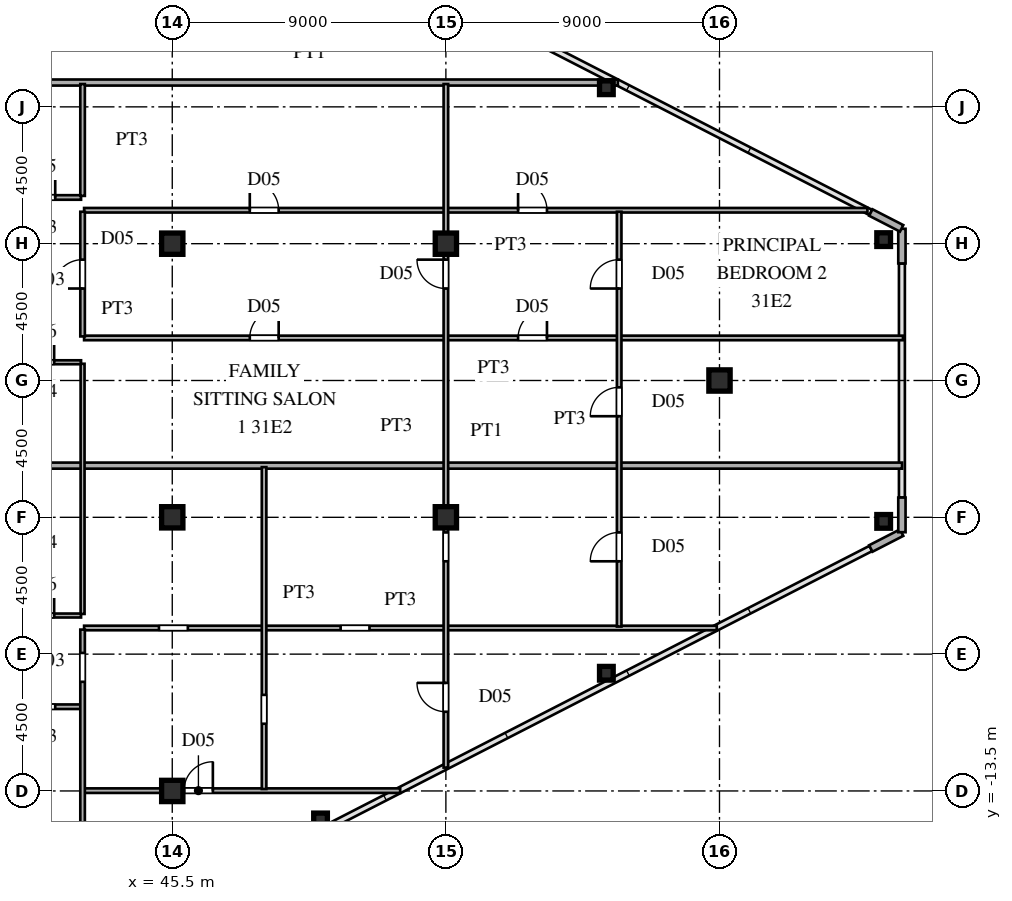
"""IFC4 building model, lengths in metres.
Left out: names, types, materials, properties, quantities, classifications, styles, units other than length and angle.
Written with IfcOpenShell. Run it as: python <this file> out.ifc"""

import sys

from ifc_helpers import new_model, si_unit, direction, frame, frame_2d, origin, origin_2d, place, context, subcontext, project, spatial, rectangle, hollow_rectangle, i_section, extrude, source, transform, mapped, element, fill, save


model = new_model("IFC4")
c1 = context("Model", 3, precision=1e-05, world=origin(), true_north=direction((0.0, 1.0)))
c2 = subcontext(c1, "Body", "Model", "MODEL_VIEW")
j1 = project(units=[si_unit("LENGTHUNIT", "METRE"), si_unit("PLANEANGLEUNIT", "RADIAN")], contexts=[c1])
p1 = place(None, origin())
s1 = spatial("IfcSite", under=j1, at=p1, CompositionType="ELEMENT")
p2 = place(p1, origin())
s2 = spatial("IfcBuilding", under=s1, at=p2, CompositionType="ELEMENT")
p3 = place(p2, frame((0.0, 0.0, 117.6)))
s3 = spatial("IfcBuildingStorey", under=s2, at=p3, CompositionType="ELEMENT", Elevation=117.6)
m1 = source(origin(), c2, "Body", "SweptSolid", [
    extrude(i_section(OverallWidth=0.7, OverallDepth=0.7, WebThickness=0.028, FlangeThickness=0.045, at=origin_2d()), origin(), (0.0, 0.0, 1.0), 3.6),
])
for number, where, z_axis, x_axis in (
    (1, (45.5, -13.5, 0.0), (0.0, 0.0, 1.0), (1.0, 0.0, 0.0)),
    (2, (45.5, -4.5, 0.0), (0.0, 0.0, 1.0), (1.0, 0.0, 0.0)),
    (3, (45.5, 4.5, 0.0), (0.0, 0.0, 1.0), (1.0, 0.0, 0.0)),
    (4, (54.5, -4.5, 0.0), (0.0, 0.0, 1.0), (1.0, 0.0, 0.0)),
    (5, (54.5, 4.5, 0.0), (0.0, 0.0, 1.0), (1.0, 0.0, 0.0)),
    (6, (63.5, 0.0, 0.0), (0.0, 0.0, 1.0), (1.0, 0.0, 0.0)),
):
    element("IfcColumn", number, at=place(p3, frame(where, z_axis=z_axis, x_axis=x_axis)), inside=s3, PredefinedType="COLUMN", context=c2, shape_type="MappedRepresentation", body=[
        mapped(m1, transform((0.0, 0.0, 0.0), scale=1.0)),
    ])
m2 = source(origin(), c2, "Body", "SweptSolid", [
    extrude(hollow_rectangle(XDim=0.45, YDim=0.45, WallThickness=0.018, at=origin_2d()), origin(), (0.0, 0.0, 1.0), 3.6),
])
for number, where, z_axis, x_axis in (
    (7, (68.9, -4.634, 0.0), (0.0, 0.0, 1.0), (1.0, 0.0, 0.0)),
    (8, (68.9, 4.634, 0.0), (0.0, 0.0, 1.0), (1.0, 0.0, 0.0)),
    (9, (50.377, -14.453, 0.0), (0.0, 0.0, 1.0), (1.0, 0.0, 0.0)),
    (10, (59.779, -9.629, 0.0), (0.0, 0.0, 1.0), (1.0, 0.0, 0.0)),
    (11, (59.779, 9.629, 0.0), (0.0, 0.0, 1.0), (1.0, 0.0, 0.0)),
):
    element("IfcColumn", number, at=place(p3, frame(where, z_axis=z_axis, x_axis=x_axis)), inside=s3, PredefinedType="COLUMN", context=c2, shape_type="MappedRepresentation", body=[
        mapped(m2, transform((0.0, 0.0, 0.0), scale=1.0)),
    ])
p4 = place(p3, frame((68.477, -5.525, 0.0), z_axis=(0.0, 0.0, 1.0), x_axis=(0.889797395748, 0.456355776255, 0.0)))
e12 = element("IfcWall", 12, at=p4, inside=s3, PredefinedType="SOLIDWALL", context=c2, shape_type="SweptSolid", body=[
    extrude(rectangle(XDim=1.14, YDim=0.24, at=frame_2d((0.57, 0.0))), origin(), (0.0, 0.0, 1.0), 3.38),
])
for number, where, z_axis, x_axis in (
    (13, (69.5, -4.99, 0.0), (0.0, 0.0, 1.0), (0.0, 1.0, 0.0)),
    (14, (69.5, 3.85, 0.0), (0.0, 0.0, 1.0), (0.0, 1.0, 0.0)),
):
    element("IfcWall", number, at=place(p3, frame(where, z_axis=z_axis, x_axis=x_axis)), inside=s3, PredefinedType="SOLIDWALL", context=c2, shape_type="SweptSolid", body=[
        extrude(rectangle(XDim=1.14, YDim=0.24, at=frame_2d((0.57, 0.0))), origin(), (0.0, 0.0, 1.0), 3.38),
    ])
p5 = place(p3, frame((69.491, 5.005, 0.0), z_axis=(0.0, 0.0, 1.0), x_axis=(-0.889797395748, 0.456355776255, 0.0)))
e15 = element("IfcWall", 15, at=p5, inside=s3, PredefinedType="SOLIDWALL", context=c2, shape_type="SweptSolid", body=[
    extrude(rectangle(XDim=1.14, YDim=0.24, at=frame_2d((0.57, 0.0))), origin(), (0.0, 0.0, 1.0), 3.38),
])
p6 = place(p3, frame((42.6, -13.49, 0.0), z_axis=(0.0, 0.0, 1.0), x_axis=(1.0, 0.0, 0.0)))
e16 = element("IfcWall", 16, at=p6, inside=s3, PredefinedType="PARTITIONING", context=c2, shape_type="SweptSolid", body=[
    extrude(rectangle(XDim=10.397, YDim=0.15, at=frame_2d((5.198, 0.0))), origin(), (0.0, 0.0, 1.0), 2.78),
])
p7 = place(p6, frame((3.285, 0.0, 0.0)))
e17 = element("IfcOpeningElement", 17, at=p7, cuts=e16, PredefinedType="OPENING", context=c2, shape_type="SweptSolid", body=[
    extrude(rectangle(XDim=0.95, YDim=2.15, at=frame_2d((0.475, 1.075))), frame((0.0, 0.085, 0.0), z_axis=(0.0, -1.0, 0.0), x_axis=(1.0, 0.0, 0.0)), (0.0, 0.0, 1.0), 0.17),
])
p8 = place(p3, frame((39.85, -10.73, 0.0), z_axis=(0.0, 0.0, 1.0), x_axis=(1.0, 0.0, 0.0)))
e18 = element("IfcWall", 18, at=p8, inside=s3, PredefinedType="PARTITIONING", context=c2, shape_type="SweptSolid", body=[
    extrude(rectangle(XDim=2.65, YDim=0.15, at=frame_2d((1.325, 0.0))), origin(), (0.0, 0.0, 1.0), 3.38),
])
p9 = place(p8, frame((0.85, 0.0, 0.0)))
e19 = element("IfcOpeningElement", 19, at=p9, cuts=e18, PredefinedType="OPENING", context=c2, shape_type="SweptSolid", body=[
    extrude(rectangle(XDim=0.95, YDim=2.15, at=frame_2d((0.475, 1.075))), frame((0.0, 0.085, 0.0), z_axis=(0.0, -1.0, 0.0), x_axis=(1.0, 0.0, 0.0)), (0.0, 0.0, 1.0), 0.17),
])
p10 = place(p3, frame((42.6, -8.14, 0.0), z_axis=(0.0, 0.0, 1.0), x_axis=(1.0, 0.0, 0.0)))
e20 = element("IfcWall", 20, at=p10, inside=s3, PredefinedType="PARTITIONING", context=c2, shape_type="SweptSolid", body=[
    extrude(rectangle(XDim=20.81, YDim=0.15, at=frame_2d((10.405, 0.0))), origin(), (0.0, 0.0, 1.0), 3.38),
])
p11 = place(p10, frame((2.462, 0.0, 0.0)))
e21 = element("IfcOpeningElement", 21, at=p11, cuts=e20, PredefinedType="OPENING", context=c2, shape_type="SweptSolid", body=[
    extrude(rectangle(XDim=0.95, YDim=2.15, at=frame_2d((0.475, 1.075))), frame((0.0, 0.085, 0.0), z_axis=(0.0, -1.0, 0.0), x_axis=(1.0, 0.0, 0.0)), (0.0, 0.0, 1.0), 0.17),
])
p12 = place(p10, frame((8.438, 0.0, 0.0)))
e22 = element("IfcOpeningElement", 22, at=p12, cuts=e20, PredefinedType="OPENING", context=c2, shape_type="SweptSolid", body=[
    extrude(rectangle(XDim=0.95, YDim=2.15, at=frame_2d((0.475, 1.075))), frame((0.0, 0.085, 0.0), z_axis=(0.0, -1.0, 0.0), x_axis=(1.0, 0.0, 0.0)), (0.0, 0.0, 1.0), 0.17),
])
p13 = place(p3, frame((39.85, -7.73, 0.0), z_axis=(0.0, 0.0, 1.0), x_axis=(1.0, 0.0, 0.0)))
e23 = element("IfcWall", 23, at=p13, inside=s3, PredefinedType="PARTITIONING", context=c2, shape_type="SweptSolid", body=[
    extrude(rectangle(XDim=2.65, YDim=0.13, at=frame_2d((1.325, 0.0))), origin(), (0.0, 0.0, 1.0), 3.38),
])
p14 = place(p13, frame((0.885, 0.0, 0.0)))
e24 = element("IfcOpeningElement", 24, at=p14, cuts=e23, PredefinedType="OPENING", context=c2, shape_type="SweptSolid", body=[
    extrude(rectangle(XDim=0.88, YDim=2.1, at=frame_2d((0.44, 1.05))), frame((0.0, 0.075, 0.0), z_axis=(0.0, -1.0, 0.0), x_axis=(1.0, 0.0, 0.0)), (0.0, 0.0, 1.0), 0.15),
])
p15 = place(p3, frame((39.88, -2.8, 0.0), z_axis=(0.0, 0.0, 1.0), x_axis=(1.0, 0.0, 0.0)))
e25 = element("IfcWall", 25, at=p15, inside=s3, PredefinedType="PARTITIONING", context=c2, shape_type="SweptSolid", body=[
    extrude(rectangle(XDim=29.625, YDim=0.2, at=frame_2d((14.812, 0.0))), origin(), (0.0, 0.0, 1.0), 3.38),
])
p16 = place(p3, frame((39.85, 0.6, 0.0), z_axis=(0.0, 0.0, 1.0), x_axis=(1.0, 0.0, 0.0)))
e26 = element("IfcWall", 26, at=p16, inside=s3, PredefinedType="PARTITIONING", context=c2, shape_type="SweptSolid", body=[
    extrude(rectangle(XDim=2.65, YDim=0.13, at=frame_2d((1.325, 0.0))), origin(), (0.0, 0.0, 1.0), 3.38),
])
p17 = place(p16, frame((0.885, 0.0, 0.0)))
e27 = element("IfcOpeningElement", 27, at=p17, cuts=e26, PredefinedType="OPENING", context=c2, shape_type="SweptSolid", body=[
    extrude(rectangle(XDim=0.88, YDim=2.1, at=frame_2d((0.44, 1.05))), frame((0.0, 0.075, 0.0), z_axis=(0.0, -1.0, 0.0), x_axis=(1.0, 0.0, 0.0)), (0.0, 0.0, 1.0), 0.15),
])
p18 = place(p3, frame((42.6, 1.4, 0.0), z_axis=(0.0, 0.0, 1.0), x_axis=(1.0, 0.0, 0.0)))
e28 = element("IfcWall", 28, at=p18, inside=s3, PredefinedType="PARTITIONING", context=c2, shape_type="SweptSolid", body=[
    extrude(rectangle(XDim=26.935, YDim=0.15, at=frame_2d((13.467, 0.0))), origin(), (0.0, 0.0, 1.0), 3.38),
])
p19 = place(p18, frame((5.45, 0.0, 0.0)))
e29 = element("IfcOpeningElement", 29, at=p19, cuts=e28, PredefinedType="OPENING", context=c2, shape_type="SweptSolid", body=[
    extrude(rectangle(XDim=0.95, YDim=2.15, at=frame_2d((0.475, 1.075))), frame((0.0, 0.085, 0.0), z_axis=(0.0, -1.0, 0.0), x_axis=(1.0, 0.0, 0.0)), (0.0, 0.0, 1.0), 0.17),
])
p20 = place(p18, frame((14.275, 0.0, 0.0)))
e30 = element("IfcOpeningElement", 30, at=p20, cuts=e28, PredefinedType="OPENING", context=c2, shape_type="SweptSolid", body=[
    extrude(rectangle(XDim=0.95, YDim=2.15, at=frame_2d((0.475, 1.075))), frame((0.0, 0.085, 0.0), z_axis=(0.0, -1.0, 0.0), x_axis=(1.0, 0.0, 0.0)), (0.0, 0.0, 1.0), 0.17),
])
p21 = place(p3, frame((42.6, 5.6, 0.0), z_axis=(0.0, 0.0, 1.0), x_axis=(1.0, 0.0, 0.0)))
e31 = element("IfcWall", 31, at=p21, inside=s3, PredefinedType="PARTITIONING", context=c2, shape_type="SweptSolid", body=[
    extrude(rectangle(XDim=25.766, YDim=0.15, at=frame_2d((12.883, 0.0))), origin(), (0.0, 0.0, 1.0), 3.38),
])
p22 = place(p21, frame((5.45, 0.0, 0.0)))
e32 = element("IfcOpeningElement", 32, at=p22, cuts=e31, PredefinedType="OPENING", context=c2, shape_type="SweptSolid", body=[
    extrude(rectangle(XDim=0.95, YDim=2.15, at=frame_2d((0.475, 1.075))), frame((0.0, 0.085, 0.0), z_axis=(0.0, -1.0, 0.0), x_axis=(1.0, 0.0, 0.0)), (0.0, 0.0, 1.0), 0.17),
])
p23 = place(p21, frame((14.275, 0.0, 0.0)))
e33 = element("IfcOpeningElement", 33, at=p23, cuts=e31, PredefinedType="OPENING", context=c2, shape_type="SweptSolid", body=[
    extrude(rectangle(XDim=0.95, YDim=2.15, at=frame_2d((0.475, 1.075))), frame((0.0, 0.085, 0.0), z_axis=(0.0, -1.0, 0.0), x_axis=(1.0, 0.0, 0.0)), (0.0, 0.0, 1.0), 0.17),
])
p24 = place(p3, frame((39.85, 6.02, 0.0), z_axis=(0.0, 0.0, 1.0), x_axis=(1.0, 0.0, 0.0)))
e34 = element("IfcWall", 34, at=p24, inside=s3, PredefinedType="PARTITIONING", context=c2, shape_type="SweptSolid", body=[
    extrude(rectangle(XDim=2.65, YDim=0.15, at=frame_2d((1.325, 0.0))), origin(), (0.0, 0.0, 1.0), 3.38),
])
p25 = place(p24, frame((0.85, 0.0, 0.0)))
e35 = element("IfcOpeningElement", 35, at=p25, cuts=e34, PredefinedType="OPENING", context=c2, shape_type="SweptSolid", body=[
    extrude(rectangle(XDim=0.95, YDim=2.15, at=frame_2d((0.475, 1.075))), frame((0.0, 0.085, 0.0), z_axis=(0.0, -1.0, 0.0), x_axis=(1.0, 0.0, 0.0)), (0.0, 0.0, 1.0), 0.17),
])
p26 = place(p3, frame((39.88, 9.8, 0.0), z_axis=(0.0, 0.0, 1.0), x_axis=(1.0, 0.0, 0.0)))
e36 = element("IfcWall", 36, at=p26, inside=s3, PredefinedType="PARTITIONING", context=c2, shape_type="SweptSolid", body=[
    extrude(rectangle(XDim=20.277, YDim=0.2, at=frame_2d((10.139, 0.0))), origin(), (0.0, 0.0, 1.0), 3.38),
])
p27 = place(p3, frame((42.55, -18.865, 0.0), z_axis=(0.0, 0.0, 1.0), x_axis=(0.0, 1.0, 0.0)))
e37 = element("IfcWall", 37, at=p27, inside=s3, PredefinedType="PARTITIONING", context=c2, shape_type="SweptSolid", body=[
    extrude(rectangle(XDim=10.672, YDim=0.15, at=frame_2d((5.336, 0.0))), origin(), (0.0, 0.0, 1.0), 3.38),
])
p28 = place(p27, frame((8.955, 0.0, 0.0)))
e38 = element("IfcOpeningElement", 38, at=p28, cuts=e37, PredefinedType="OPENING", context=c2, shape_type="SweptSolid", body=[
    extrude(rectangle(XDim=0.95, YDim=2.15, at=frame_2d((0.475, 1.075))), frame((0.0, 0.085, 0.0), z_axis=(0.0, -1.0, 0.0), x_axis=(1.0, 0.0, 0.0)), (0.0, 0.0, 1.0), 0.17),
])
p29 = place(p3, frame((42.55, -7.678, 0.0), z_axis=(0.0, 0.0, 1.0), x_axis=(0.0, 1.0, 0.0)))
e39 = element("IfcWall", 39, at=p29, inside=s3, PredefinedType="PARTITIONING", context=c2, shape_type="SweptSolid", body=[
    extrude(rectangle(XDim=8.228, YDim=0.13, at=frame_2d((4.114, 0.0))), origin(), (0.0, 0.0, 1.0), 3.38),
])
p30 = place(p3, frame((42.55, 1.45, 0.0), z_axis=(0.0, 0.0, 1.0), x_axis=(0.0, 1.0, 0.0)))
e40 = element("IfcWall", 40, at=p30, inside=s3, PredefinedType="PARTITIONING", context=c2, shape_type="SweptSolid", body=[
    extrude(rectangle(XDim=4.1, YDim=0.15, at=frame_2d((2.05, 0.0))), origin(), (0.0, 0.0, 1.0), 3.38),
])
p31 = place(p30, frame((1.575, 0.0, 0.0)))
e41 = element("IfcOpeningElement", 41, at=p31, cuts=e40, PredefinedType="OPENING", context=c2, shape_type="SweptSolid", body=[
    extrude(rectangle(XDim=0.95, YDim=2.15, at=frame_2d((0.475, 1.075))), frame((0.0, 0.085, 0.0), z_axis=(0.0, -1.0, 0.0), x_axis=(1.0, 0.0, 0.0)), (0.0, 0.0, 1.0), 0.17),
])
p32 = place(p3, frame((42.55, 6.072, 0.0), z_axis=(0.0, 0.0, 1.0), x_axis=(0.0, 1.0, 0.0)))
e42 = element("IfcWall", 42, at=p32, inside=s3, PredefinedType="PARTITIONING", context=c2, shape_type="SweptSolid", body=[
    extrude(rectangle(XDim=3.678, YDim=0.15, at=frame_2d((1.839, 0.0))), origin(), (0.0, 0.0, 1.0), 3.38),
])
p33 = place(p3, frame((48.52, -13.436, 0.0), z_axis=(0.0, 0.0, 1.0), x_axis=(0.0, 1.0, 0.0)))
e43 = element("IfcWall", 43, at=p33, inside=s3, PredefinedType="PARTITIONING", context=c2, shape_type="SweptSolid", body=[
    extrude(rectangle(XDim=10.586, YDim=0.15, at=frame_2d((5.293, 0.0))), origin(), (0.0, 0.0, 1.0), 3.38),
])
p34 = place(p33, frame((2.146, 0.0, 0.0)))
e44 = element("IfcOpeningElement", 44, at=p34, cuts=e43, PredefinedType="OPENING", context=c2, shape_type="SweptSolid", body=[
    extrude(rectangle(XDim=0.95, YDim=2.15, at=frame_2d((0.475, 1.075))), frame((0.0, 0.085, 0.0), z_axis=(0.0, -1.0, 0.0), x_axis=(1.0, 0.0, 0.0)), (0.0, 0.0, 1.0), 0.17),
])
p35 = place(p3, frame((54.5, -12.732, 0.0), z_axis=(0.0, 0.0, 1.0), x_axis=(0.0, 1.0, 0.0)))
e45 = element("IfcWall", 45, at=p35, inside=s3, PredefinedType="PARTITIONING", context=c2, shape_type="SweptSolid", body=[
    extrude(rectangle(XDim=22.482, YDim=0.15, at=frame_2d((11.241, 0.0))), origin(), (0.0, 0.0, 1.0), 2.78),
])
p36 = place(p35, frame((1.837, 0.0, 0.0)))
e46 = element("IfcOpeningElement", 46, at=p36, cuts=e45, PredefinedType="OPENING", context=c2, shape_type="SweptSolid", body=[
    extrude(rectangle(XDim=0.95, YDim=2.15, at=frame_2d((0.475, 1.075))), frame((0.0, 0.085, 0.0), z_axis=(0.0, -1.0, 0.0), x_axis=(1.0, 0.0, 0.0)), (0.0, 0.0, 1.0), 0.17),
])
p37 = place(p35, frame((6.785, 0.0, 0.0)))
e47 = element("IfcOpeningElement", 47, at=p37, cuts=e45, PredefinedType="OPENING", context=c2, shape_type="SweptSolid", body=[
    extrude(rectangle(XDim=0.95, YDim=2.15, at=frame_2d((0.475, 1.075))), frame((0.0, 0.085, 0.0), z_axis=(0.0, -1.0, 0.0), x_axis=(1.0, 0.0, 0.0)), (0.0, 0.0, 1.0), 0.17),
])
p38 = place(p35, frame((15.757, 0.0, 0.0)))
e48 = element("IfcOpeningElement", 48, at=p38, cuts=e45, PredefinedType="OPENING", context=c2, shape_type="SweptSolid", body=[
    extrude(rectangle(XDim=0.95, YDim=2.15, at=frame_2d((0.475, 1.075))), frame((0.0, 0.085, 0.0), z_axis=(0.0, -1.0, 0.0), x_axis=(1.0, 0.0, 0.0)), (0.0, 0.0, 1.0), 0.17),
])
p39 = place(p3, frame((60.2, -8.093, 0.0), z_axis=(0.0, 0.0, 1.0), x_axis=(0.0, 1.0, 0.0)))
e49 = element("IfcWall", 49, at=p39, inside=s3, PredefinedType="PARTITIONING", context=c2, shape_type="SweptSolid", body=[
    extrude(rectangle(XDim=13.643, YDim=0.15, at=frame_2d((6.822, 0.0))), origin(), (0.0, 0.0, 1.0), 3.38),
])
p40 = place(p39, frame((2.146, 0.0, 0.0)))
e50 = element("IfcOpeningElement", 50, at=p40, cuts=e49, PredefinedType="OPENING", context=c2, shape_type="SweptSolid", body=[
    extrude(rectangle(XDim=0.95, YDim=2.15, at=frame_2d((0.475, 1.075))), frame((0.0, 0.085, 0.0), z_axis=(0.0, -1.0, 0.0), x_axis=(1.0, 0.0, 0.0)), (0.0, 0.0, 1.0), 0.17),
])
p41 = place(p39, frame((6.918, 0.0, 0.0)))
e51 = element("IfcOpeningElement", 51, at=p41, cuts=e49, PredefinedType="OPENING", context=c2, shape_type="SweptSolid", body=[
    extrude(rectangle(XDim=0.95, YDim=2.15, at=frame_2d((0.475, 1.075))), frame((0.0, 0.085, 0.0), z_axis=(0.0, -1.0, 0.0), x_axis=(1.0, 0.0, 0.0)), (0.0, 0.0, 1.0), 0.17),
])
p42 = place(p39, frame((11.118, 0.0, 0.0)))
e52 = element("IfcOpeningElement", 52, at=p42, cuts=e49, PredefinedType="OPENING", context=c2, shape_type="SweptSolid", body=[
    extrude(rectangle(XDim=0.95, YDim=2.15, at=frame_2d((0.475, 1.075))), frame((0.0, 0.085, 0.0), z_axis=(0.0, -1.0, 0.0), x_axis=(1.0, 0.0, 0.0)), (0.0, 0.0, 1.0), 0.17),
])
m3 = source(origin(), c2, "Body", "SweptSolid", [
    extrude(rectangle(XDim=0.95, YDim=2.15, at=frame_2d((0.475, 1.075))), frame((0.0, 0.025, 0.0), z_axis=(0.0, -1.0, 0.0), x_axis=(1.0, 0.0, 0.0)), (0.0, 0.0, 1.0), 0.05),
])
p43 = place(p7, origin())
e53 = element("IfcDoor", 53, at=p43, inside=s3, OperationType="SINGLE_SWING_RIGHT", PredefinedType="DOOR", context=c2, shape_type="MappedRepresentation", body=[
    mapped(m3, transform((0.0, 0.0, 0.0), scale=1.0)),
])
fill(e17, e53)
m4 = source(origin(), c2, "Body", "SweptSolid", [
    extrude(rectangle(XDim=0.88, YDim=2.1, at=frame_2d((0.44, 1.05))), frame((0.0, 0.025, 0.0), z_axis=(0.0, -1.0, 0.0), x_axis=(1.0, 0.0, 0.0)), (0.0, 0.0, 1.0), 0.05),
])
p44 = place(p14, origin())
e54 = element("IfcDoor", 54, at=p44, inside=s3, OperationType="SINGLE_SWING_RIGHT", PredefinedType="DOOR", context=c2, shape_type="MappedRepresentation", body=[
    mapped(m4, transform((0.0, 0.0, 0.0), scale=1.0)),
])
fill(e24, e54)
p45 = place(p17, origin())
e55 = element("IfcDoor", 55, at=p45, inside=s3, OperationType="SINGLE_SWING_RIGHT", PredefinedType="DOOR", context=c2, shape_type="MappedRepresentation", body=[
    mapped(m4, transform((0.0, 0.0, 0.0), scale=1.0)),
])
fill(e27, e55)
p46 = place(p19, origin())
e56 = element("IfcDoor", 56, at=p46, inside=s3, OperationType="SINGLE_SWING_RIGHT", PredefinedType="DOOR", context=c2, shape_type="MappedRepresentation", body=[
    mapped(m3, transform((0.0, 0.0, 0.0), scale=1.0)),
])
fill(e29, e56)
p47 = place(p20, origin())
e57 = element("IfcDoor", 57, at=p47, inside=s3, OperationType="SINGLE_SWING_RIGHT", PredefinedType="DOOR", context=c2, shape_type="MappedRepresentation", body=[
    mapped(m3, transform((0.0, 0.0, 0.0), scale=1.0)),
])
fill(e30, e57)
p48 = place(p22, origin())
e58 = element("IfcDoor", 58, at=p48, inside=s3, OperationType="SINGLE_SWING_LEFT", PredefinedType="DOOR", context=c2, shape_type="MappedRepresentation", body=[
    mapped(m3, transform((0.0, 0.0, 0.0), scale=1.0)),
])
fill(e32, e58)
p49 = place(p23, origin())
e59 = element("IfcDoor", 59, at=p49, inside=s3, OperationType="SINGLE_SWING_LEFT", PredefinedType="DOOR", context=c2, shape_type="MappedRepresentation", body=[
    mapped(m3, transform((0.0, 0.0, 0.0), scale=1.0)),
])
fill(e33, e59)
p50 = place(p25, origin())
e60 = element("IfcDoor", 60, at=p50, inside=s3, OperationType="SINGLE_SWING_RIGHT", PredefinedType="DOOR", context=c2, shape_type="MappedRepresentation", body=[
    mapped(m3, transform((0.0, 0.0, 0.0), scale=1.0)),
])
fill(e35, e60)
p51 = place(p31, origin())
e61 = element("IfcDoor", 61, at=p51, inside=s3, OperationType="SINGLE_SWING_LEFT", PredefinedType="DOOR", context=c2, shape_type="MappedRepresentation", body=[
    mapped(m3, transform((0.0, 0.0, 0.0), scale=1.0)),
])
fill(e41, e61)
p52 = place(p36, origin())
e62 = element("IfcDoor", 62, at=p52, inside=s3, OperationType="SINGLE_SWING_RIGHT", PredefinedType="DOOR", context=c2, shape_type="MappedRepresentation", body=[
    mapped(m3, transform((0.0, 0.0, 0.0), scale=1.0)),
])
fill(e46, e62)
p53 = place(p38, origin())
e63 = element("IfcDoor", 63, at=p53, inside=s3, OperationType="SINGLE_SWING_RIGHT", PredefinedType="DOOR", context=c2, shape_type="MappedRepresentation", body=[
    mapped(m3, transform((0.0, 0.0, 0.0), scale=1.0)),
])
fill(e48, e63)
p54 = place(p40, origin())
e64 = element("IfcDoor", 64, at=p54, inside=s3, OperationType="SINGLE_SWING_LEFT", PredefinedType="DOOR", context=c2, shape_type="MappedRepresentation", body=[
    mapped(m3, transform((0.0, 0.0, 0.0), scale=1.0)),
])
fill(e50, e64)
p55 = place(p41, origin())
e65 = element("IfcDoor", 65, at=p55, inside=s3, OperationType="SINGLE_SWING_LEFT", PredefinedType="DOOR", context=c2, shape_type="MappedRepresentation", body=[
    mapped(m3, transform((0.0, 0.0, 0.0), scale=1.0)),
])
fill(e51, e65)
p56 = place(p42, origin())
e66 = element("IfcDoor", 66, at=p56, inside=s3, OperationType="SINGLE_SWING_LEFT", PredefinedType="DOOR", context=c2, shape_type="MappedRepresentation", body=[
    mapped(m3, transform((0.0, 0.0, 0.0), scale=1.0)),
])
fill(e52, e66)
save(model, sys.argv[1])
